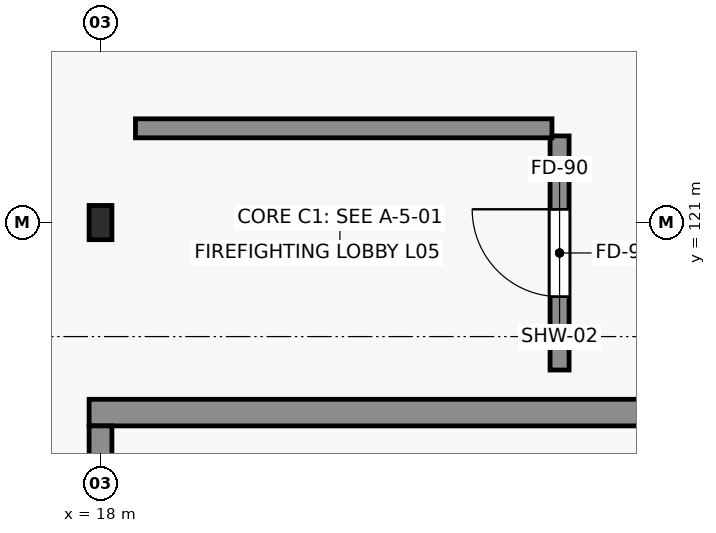
"""IFC4 building model, lengths in metres.
Left out: names, types, materials, properties, quantities, classifications, styles, units other than length and angle.
Written with IfcOpenShell. Run it as: python <this file> out.ifc"""

import sys

from ifc_helpers import new_model, si_unit, direction, frame, frame_2d, origin, origin_2d, place, context, subcontext, project, spatial, rectangle, i_section, extrude, element, fill, save


model = new_model("IFC4")
c1 = context("Model", 3, precision=1e-05, world=origin(), true_north=direction((0.0, 1.0)))
c2 = subcontext(c1, "Body", "Model", "MODEL_VIEW")
j1 = project(units=[si_unit("LENGTHUNIT", "METRE"), si_unit("PLANEANGLEUNIT", "RADIAN")], contexts=[c1])
p1 = place(None, origin())
s1 = spatial("IfcSite", under=j1, at=p1, CompositionType="ELEMENT")
p2 = place(p1, origin())
s2 = spatial("IfcBuilding", under=s1, at=p2, CompositionType="ELEMENT")
p3 = place(p2, frame((0.0, 0.0, 24.0)))
s3 = spatial("IfcBuildingStorey", under=s2, at=p3, CompositionType="ELEMENT", Elevation=24.0)
p4 = place(p3, frame((18.0, 121.0, 0.0), z_axis=(0.0, 0.0, 1.0), x_axis=(1.0, 0.0, 0.0)))
e1 = element("IfcColumn", 1, at=p4, inside=s3, PredefinedType="COLUMN", context=c2, shape_type="SweptSolid", body=[
    extrude(i_section(OverallWidth=0.3, OverallDepth=0.45, WebThickness=0.014, FlangeThickness=0.026, FilletRadius=0.027, at=origin_2d()), origin(), (0.0, 0.0, 1.0), 3.98),
])
p5 = place(p3, frame((17.85, 118.5, 0.0), z_axis=(0.0, 0.0, 1.0), x_axis=(1.0, 0.0, 0.0)))
e2 = element("IfcWall", 2, at=p5, inside=s3, PredefinedType="SHEAR", context=c2, shape_type="SweptSolid", body=[
    extrude(rectangle(XDim=9.3, YDim=0.35, at=frame_2d((4.65, 0.0))), origin(), (0.0, 0.0, 1.0), 3.98),
])
p6 = place(p3, frame((18.0, 113.5, 0.0), z_axis=(0.0, 0.0, 1.0), x_axis=(0.0, 1.0, 0.0)))
e3 = element("IfcWall", 3, at=p6, inside=s3, PredefinedType="SHEAR", context=c2, shape_type="SweptSolid", body=[
    extrude(rectangle(XDim=4.825, YDim=0.3, at=frame_2d((2.413, 0.0))), origin(), (0.0, 0.0, 1.0), 3.98),
])
p7 = place(p3, frame((24.04, 119.06, 0.0), z_axis=(0.0, 0.0, 1.0), x_axis=(0.0, 1.0, 0.0)))
e4 = element("IfcWall", 4, at=p7, inside=s3, PredefinedType="SOLIDWALL", context=c2, shape_type="SweptSolid", body=[
    extrude(rectangle(XDim=3.08, YDim=0.25, at=frame_2d((1.54, 0.0))), origin(), (0.0, 0.0, 1.0), 3.5),
])
p8 = place(p7, frame((0.965, 0.0, 0.0)))
e5 = element("IfcOpeningElement", 5, at=p8, cuts=e4, PredefinedType="OPENING", context=c2, shape_type="SweptSolid", body=[
    extrude(rectangle(XDim=1.15, YDim=2.2, at=frame_2d((0.575, 1.1))), frame((0.0, 0.135, 0.0), z_axis=(0.0, -1.0, 0.0), x_axis=(1.0, 0.0, 0.0)), (0.0, 0.0, 1.0), 0.27),
])
p9 = place(p3, frame((18.46, 122.24, 0.0), z_axis=(0.0, 0.0, 1.0), x_axis=(1.0, 0.0, 0.0)))
e6 = element("IfcWall", 6, at=p9, inside=s3, PredefinedType="SOLIDWALL", context=c2, shape_type="SweptSolid", body=[
    extrude(rectangle(XDim=5.48, YDim=0.25, at=frame_2d((2.74, 0.0))), origin(), (0.0, 0.0, 1.0), 3.75),
])
p10 = place(p8, origin())
e7 = element("IfcDoor", 7, at=p10, inside=s3, OperationType="SINGLE_SWING_RIGHT", PredefinedType="DOOR", context=c2, shape_type="SweptSolid", body=[
    extrude(rectangle(XDim=1.15, YDim=2.2, at=frame_2d((0.575, 1.1))), frame((0.0, 0.025, 0.0), z_axis=(0.0, -1.0, 0.0), x_axis=(1.0, 0.0, 0.0)), (0.0, 0.0, 1.0), 0.05),
])
fill(e5, e7)
save(model, sys.argv[1])
